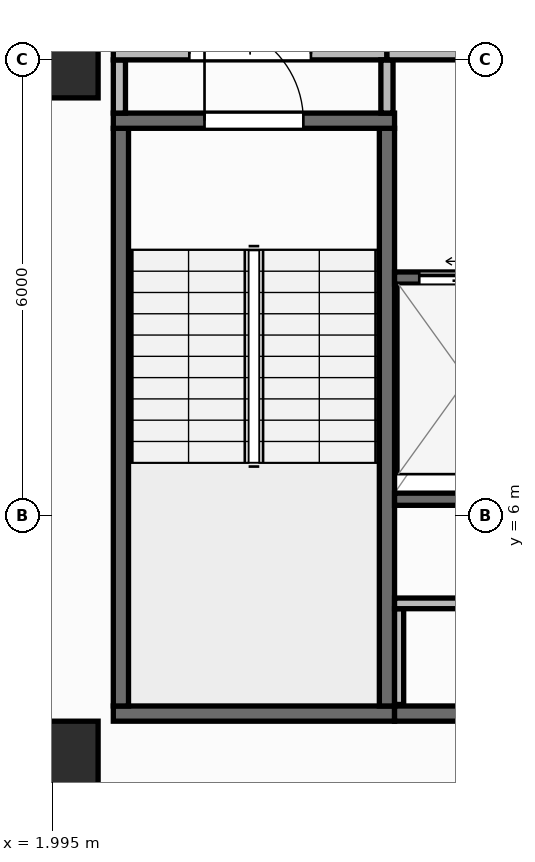
"""IFC4 building model, lengths in metres.
Left out: names, types, materials, properties, quantities, classifications, styles, units other than length and angle.
Written with IfcOpenShell. Run it as: python <this file> out.ifc"""

import sys

from ifc_helpers import new_model, si_unit, direction, frame, frame_2d, origin, origin_2d, place, context, subcontext, project, spatial, rectangle, extrude, element, fill, save


model = new_model("IFC4")
c1 = context("Model", 3, precision=1e-05, world=origin(), true_north=direction((0.0, 1.0)))
c2 = subcontext(c1, "Body", "Model", "MODEL_VIEW")
j1 = project(units=[si_unit("LENGTHUNIT", "METRE"), si_unit("PLANEANGLEUNIT", "RADIAN")], contexts=[c1])
p1 = place(None, origin())
s1 = spatial("IfcSite", under=j1, at=p1, CompositionType="ELEMENT")
p2 = place(p1, origin())
s2 = spatial("IfcBuilding", under=s1, at=p2, CompositionType="ELEMENT")
p3 = place(p2, frame((0.0, 0.0, 211.85)))
s3 = spatial("IfcBuildingStorey", under=s2, at=p3, CompositionType="ELEMENT", Elevation=211.85)
for number, where, z_axis, x_axis in (
    (1, (2.1, 2.8, 0.0), (0.0, 0.0, 1.0), (1.0, 0.0, 0.0)),
    (2, (2.1, 12.0, 0.0), (0.0, 0.0, 1.0), (1.0, 0.0, 0.0)),
):
    element("IfcColumn", number, at=place(p3, frame(where, z_axis=z_axis, x_axis=x_axis)), inside=s3, PredefinedType="COLUMN", context=c2, shape_type="SweptSolid", body=[
        extrude(rectangle(XDim=1.0, YDim=1.0, at=origin_2d()), origin(), (0.0, 0.0, 1.0), 3.95),
    ])
p4 = place(p3, frame((2.66, 0.174, 0.0), z_axis=(0.0, 0.0, 1.0), x_axis=(0.996634028439, 0.081979347142, 0.0)))
e3 = element("IfcWall", 3, at=p4, inside=s3, PredefinedType="STANDARD", context=c2, shape_type="SweptSolid", body=[
    extrude(rectangle(XDim=46.035, YDim=0.26, at=frame_2d((23.018, 0.0))), origin(), (0.0, 0.0, 1.0), 3.71),
])
p5 = place(p4, frame((21.817, 0.0, 0.9)))
e4 = element("IfcOpeningElement", 4, at=p5, cuts=e3, PredefinedType="OPENING", context=c2, shape_type="SweptSolid", body=[
    extrude(rectangle(XDim=2.4, YDim=1.65, at=frame_2d((1.2, 0.825))), frame((0.0, 0.14, 0.0), z_axis=(0.0, -1.0, 0.0), x_axis=(1.0, 0.0, 0.0)), (0.0, 0.0, 1.0), 0.28),
])
p6 = place(p3, frame((2.8, 3.4, 0.0), z_axis=(0.0, 0.0, 1.0), x_axis=(1.0, 0.0, 0.0)))
e5 = element("IfcWall", 5, at=p6, inside=s3, PredefinedType="SHEAR", context=c2, shape_type="SweptSolid", body=[
    extrude(rectangle(XDim=3.7, YDim=0.2, at=frame_2d((1.85, 0.0))), origin(), (0.0, 0.0, 1.0), 3.71),
])
for number, where, z_axis, x_axis in (
    (6, (2.9, 3.5, 0.0), (0.0, 0.0, 1.0), (0.0, 1.0, 0.0)),
    (7, (6.4, 3.5, 0.0), (0.0, 0.0, 1.0), (0.0, 1.0, 0.0)),
):
    element("IfcWall", number, at=place(p3, frame(where, z_axis=z_axis, x_axis=x_axis)), inside=s3, PredefinedType="SHEAR", context=c2, shape_type="SweptSolid", body=[
        extrude(rectangle(XDim=7.6, YDim=0.2, at=frame_2d((3.8, 0.0))), origin(), (0.0, 0.0, 1.0), 3.71),
    ])
p7 = place(p3, frame((2.8, 11.2, 0.0), z_axis=(0.0, 0.0, 1.0), x_axis=(1.0, 0.0, 0.0)))
e8 = element("IfcWall", 8, at=p7, inside=s3, PredefinedType="SHEAR", context=c2, shape_type="SweptSolid", body=[
    extrude(rectangle(XDim=3.7, YDim=0.2, at=frame_2d((1.85, 0.0))), origin(), (0.0, 0.0, 1.0), 3.71),
])
p8 = place(p7, frame((1.2, 0.0, 0.0)))
e9 = element("IfcOpeningElement", 9, at=p8, cuts=e8, PredefinedType="OPENING", context=c2, shape_type="SweptSolid", body=[
    extrude(rectangle(XDim=1.3, YDim=2.15, at=frame_2d((0.65, 1.075))), frame((0.0, 0.11, 0.0), z_axis=(0.0, -1.0, 0.0), x_axis=(1.0, 0.0, 0.0)), (0.0, 0.0, 1.0), 0.22),
])
p9 = place(p3, frame((6.5, 3.4, 0.0), z_axis=(0.0, 0.0, 1.0), x_axis=(1.0, 0.0, 0.0)))
e10 = element("IfcWall", 10, at=p9, inside=s3, PredefinedType="SHEAR", context=c2, shape_type="SweptSolid", body=[
    extrude(rectangle(XDim=13.7, YDim=0.2, at=frame_2d((6.85, 0.0))), origin(), (0.0, 0.0, 1.0), 3.71),
])
p10 = place(p3, frame((6.5, 6.22, 0.0), z_axis=(0.0, 0.0, 1.0), x_axis=(1.0, 0.0, 0.0)))
e11 = element("IfcWall", 11, at=p10, inside=s3, PredefinedType="SHEAR", context=c2, shape_type="SweptSolid", body=[
    extrude(rectangle(XDim=12.11, YDim=0.16, at=frame_2d((6.055, 0.0))), origin(), (0.0, 0.0, 1.0), 3.71),
])
p11 = place(p3, frame((6.5, 9.13, 0.0), z_axis=(0.0, 0.0, 1.0), x_axis=(1.0, 0.0, 0.0)))
e12 = element("IfcWall", 12, at=p11, inside=s3, PredefinedType="SHEAR", context=c2, shape_type="SweptSolid", body=[
    extrude(rectangle(XDim=1.975, YDim=0.16, at=frame_2d((0.988, 0.0))), origin(), (0.0, 0.0, 1.0), 3.71),
])
p12 = place(p11, frame((0.325, 0.0, 0.0)))
e13 = element("IfcOpeningElement", 13, at=p12, cuts=e12, PredefinedType="OPENING", context=c2, shape_type="SweptSolid", body=[
    extrude(rectangle(XDim=1.25, YDim=2.15, at=frame_2d((0.625, 1.075))), frame((0.0, 0.09, 0.0), z_axis=(0.0, -1.0, 0.0), x_axis=(1.0, 0.0, 0.0)), (0.0, 0.0, 1.0), 0.18),
])
p13 = place(p3, frame((6.56, 3.52, 0.0), z_axis=(0.0, 0.0, 1.0), x_axis=(0.0, 1.0, 0.0)))
e14 = element("IfcWall", 14, at=p13, inside=s3, PredefinedType="PARTITIONING", context=c2, shape_type="SweptSolid", body=[
    extrude(rectangle(XDim=1.26, YDim=0.12, at=frame_2d((0.63, 0.0))), origin(), (0.0, 0.0, 1.0), 3.71),
])
p14 = place(p3, frame((6.5, 4.85, 0.0), z_axis=(0.0, 0.0, 1.0), x_axis=(1.0, 0.0, 0.0)))
e15 = element("IfcWall", 15, at=p14, inside=s3, PredefinedType="PARTITIONING", context=c2, shape_type="SweptSolid", body=[
    extrude(rectangle(XDim=5.67, YDim=0.14, at=frame_2d((2.835, 0.0))), origin(), (0.0, 0.0, 1.0), 3.71),
])
p15 = place(p14, frame((2.285, 0.0, 0.0)))
e16 = element("IfcOpeningElement", 16, at=p15, cuts=e15, PredefinedType="OPENING", context=c2, shape_type="SweptSolid", body=[
    extrude(rectangle(XDim=1.1, YDim=2.1, at=frame_2d((0.55, 1.05))), frame((0.0, 0.08, 0.0), z_axis=(0.0, -1.0, 0.0), x_axis=(1.0, 0.0, 0.0)), (0.0, 0.0, 1.0), 0.16),
])
p16 = place(p3, frame((2.88, 11.3, 0.0), z_axis=(0.0, 0.0, 1.0), x_axis=(0.0, 1.0, 0.0)))
e17 = element("IfcWall", 17, at=p16, inside=s3, PredefinedType="PARTITIONING", context=c2, shape_type="SweptSolid", body=[
    extrude(rectangle(XDim=0.7, YDim=0.16, at=frame_2d((0.35, 0.0))), origin(), (0.0, 0.0, 1.0), 3.71),
])
p17 = place(p3, frame((2.8, 12.08, 0.0), z_axis=(0.0, 0.0, 1.0), x_axis=(1.0, 0.0, 0.0)))
e18 = element("IfcWall", 18, at=p17, inside=s3, PredefinedType="PARTITIONING", context=c2, shape_type="SweptSolid", body=[
    extrude(rectangle(XDim=3.6, YDim=0.16, at=frame_2d((1.8, 0.0))), origin(), (0.0, 0.0, 1.0), 3.152),
])
p18 = place(p17, frame((1.0, 0.0, 0.0)))
e19 = element("IfcOpeningElement", 19, at=p18, cuts=e18, PredefinedType="OPENING", context=c2, shape_type="SweptSolid", body=[
    extrude(rectangle(XDim=1.6, YDim=2.05, at=frame_2d((0.8, 1.025))), frame((0.0, 0.09, 0.0), z_axis=(0.0, -1.0, 0.0), x_axis=(1.0, 0.0, 0.0)), (0.0, 0.0, 1.0), 0.18),
])
p19 = place(p3, frame((6.4, 11.3, 0.0), z_axis=(0.0, 0.0, 1.0), x_axis=(0.0, 1.0, 0.0)))
e20 = element("IfcWall", 20, at=p19, inside=s3, PredefinedType="PARTITIONING", context=c2, shape_type="SweptSolid", body=[
    extrude(rectangle(XDim=0.7, YDim=0.16, at=frame_2d((0.35, 0.0))), origin(), (0.0, 0.0, 1.0), 3.71),
])
p20 = place(p3, frame((6.4, 12.08, 0.0), z_axis=(0.0, 0.0, 1.0), x_axis=(1.0, 0.0, 0.0)))
e21 = element("IfcWall", 21, at=p20, inside=s3, PredefinedType="PARTITIONING", context=c2, shape_type="SweptSolid", body=[
    extrude(rectangle(XDim=6.18, YDim=0.16, at=frame_2d((3.09, 0.0))), origin(), (0.0, 0.0, 1.0), 3.152),
])
p21 = place(p20, frame((2.29, 0.0, 0.0)))
e22 = element("IfcOpeningElement", 22, at=p21, cuts=e21, PredefinedType="OPENING", context=c2, shape_type="SweptSolid", body=[
    extrude(rectangle(XDim=1.6, YDim=2.05, at=frame_2d((0.8, 1.025))), frame((0.0, 0.09, 0.0), z_axis=(0.0, -1.0, 0.0), x_axis=(1.0, 0.0, 0.0)), (0.0, 0.0, 1.0), 0.18),
])
p22 = place(p8, origin())
e23 = element("IfcDoor", 23, at=p22, inside=s3, OperationType="SINGLE_SWING_LEFT", PredefinedType="DOOR", context=c2, shape_type="SweptSolid", body=[
    extrude(rectangle(XDim=1.3, YDim=2.15, at=frame_2d((0.65, 1.075))), frame((0.0, 0.025, 0.0), z_axis=(0.0, -1.0, 0.0), x_axis=(1.0, 0.0, 0.0)), (0.0, 0.0, 1.0), 0.05),
])
fill(e9, e23)
p23 = place(p12, origin())
e24 = element("IfcDoor", 24, at=p23, inside=s3, OperationType="SLIDING_TO_LEFT", PredefinedType="DOOR", context=c2, shape_type="SweptSolid", body=[
    extrude(rectangle(XDim=1.25, YDim=2.15, at=frame_2d((0.625, 1.075))), frame((0.0, 0.025, 0.0), z_axis=(0.0, -1.0, 0.0), x_axis=(1.0, 0.0, 0.0)), (0.0, 0.0, 1.0), 0.05),
])
fill(e13, e24)
p24 = place(p18, origin())
e25 = element("IfcDoor", 25, at=p24, inside=s3, OperationType="DOUBLE_DOOR_SINGLE_SWING", PredefinedType="DOOR", context=c2, shape_type="SweptSolid", body=[
    extrude(rectangle(XDim=1.6, YDim=2.05, at=frame_2d((0.8, 1.025))), frame((0.0, 0.025, 0.0), z_axis=(0.0, -1.0, 0.0), x_axis=(1.0, 0.0, 0.0)), (0.0, 0.0, 1.0), 0.05),
])
fill(e19, e25)
save(model, sys.argv[1])
